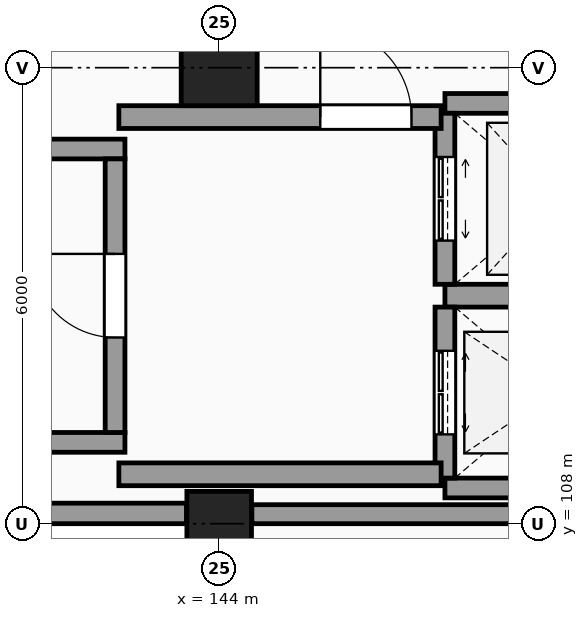
"""IFC4 building model, lengths in metres.
Left out: names, types, materials, properties, quantities, classifications, styles, units other than length and angle.
Written with IfcOpenShell. Run it as: python <this file> out.ifc"""

import sys

from ifc_helpers import new_model, si_unit, direction, frame, frame_2d, origin, origin_2d, place, context, subcontext, project, spatial, rectangle, circle, extrude, element, fill, save


model = new_model("IFC4")
c1 = context("Model", 3, precision=1e-05, world=origin(), true_north=direction((0.0, 1.0)))
c2 = subcontext(c1, "Body", "Model", "MODEL_VIEW")
j1 = project(units=[si_unit("LENGTHUNIT", "METRE"), si_unit("PLANEANGLEUNIT", "RADIAN")], contexts=[c1])
p1 = place(None, origin())
s1 = spatial("IfcSite", under=j1, at=p1, CompositionType="ELEMENT")
p2 = place(p1, origin())
s2 = spatial("IfcBuilding", under=s1, at=p2, CompositionType="ELEMENT")
p3 = place(p2, frame((0.0, 0.0, 6.0)))
s3 = spatial("IfcBuildingStorey", under=s2, at=p3, CompositionType="ELEMENT", Elevation=6.0)
p4 = place(p3, frame((144.0, 108.0, 0.0), z_axis=(0.0, 0.0, 1.0), x_axis=(1.0, 0.0, 0.0)))
e1 = element("IfcColumn", 1, at=p4, inside=s3, PredefinedType="COLUMN", context=c2, shape_type="SweptSolid", body=[
    extrude(circle(Radius=0.425, at=origin_2d()), origin(), (0.0, 0.0, 1.0), 4.5),
])
p5 = place(p3, frame((144.0, 114.0, 0.0), z_axis=(0.0, 0.0, 1.0), x_axis=(1.0, 0.0, 0.0)))
e2 = element("IfcColumn", 2, at=p5, inside=s3, PredefinedType="COLUMN", context=c2, shape_type="SweptSolid", body=[
    extrude(circle(Radius=0.5, at=origin_2d()), origin(), (0.0, 0.0, 1.0), 4.5),
])
p6 = place(p3, frame((138.38, 108.135, 0.0), z_axis=(0.0, 0.0, 1.0), x_axis=(1.0, 0.0, 0.0)))
e3 = element("IfcWall", 3, at=p6, inside=s3, PredefinedType="SOLIDWALL", context=c2, shape_type="SweptSolid", body=[
    extrude(rectangle(XDim=5.19, YDim=0.27, at=frame_2d((2.595, 0.0))), origin(), (0.0, 0.0, 1.0), 3.47),
])
p7 = place(p3, frame((144.43, 108.125, 0.0), z_axis=(0.0, 0.0, 1.0), x_axis=(1.0, 0.0, 0.0)))
e4 = element("IfcWall", 4, at=p7, inside=s3, PredefinedType="SOLIDWALL", context=c2, shape_type="SweptSolid", body=[
    extrude(rectangle(XDim=5.065, YDim=0.25, at=frame_2d((2.533, 0.0))), origin(), (0.0, 0.0, 1.0), 3.47),
])
for number, where, z_axis, x_axis in (
    (5, (132.04, 109.07, 0.0), (0.0, 0.0, 1.0), (1.0, 0.0, 0.0)),
    (6, (132.04, 112.93, 0.0), (0.0, 0.0, 1.0), (1.0, 0.0, 0.0)),
):
    element("IfcWall", number, at=place(p3, frame(where, z_axis=z_axis, x_axis=x_axis)), inside=s3, PredefinedType="SHEAR", context=c2, shape_type="SweptSolid", body=[
        extrude(rectangle(XDim=10.72, YDim=0.26, at=frame_2d((5.36, 0.0))), origin(), (0.0, 0.0, 1.0), 4.5),
    ])
p8 = place(p3, frame((142.63, 109.2, 0.0), z_axis=(0.0, 0.0, 1.0), x_axis=(0.0, 1.0, 0.0)))
e7 = element("IfcWall", 7, at=p8, inside=s3, PredefinedType="SHEAR", context=c2, shape_type="SweptSolid", body=[
    extrude(rectangle(XDim=3.6, YDim=0.26, at=frame_2d((1.8, 0.0))), origin(), (0.0, 0.0, 1.0), 4.5),
])
p9 = place(p8, frame((1.25, 0.0, 0.0)))
e8 = element("IfcOpeningElement", 8, at=p9, cuts=e7, PredefinedType="OPENING", context=c2, shape_type="SweptSolid", body=[
    extrude(rectangle(XDim=1.1, YDim=2.15, at=frame_2d((0.55, 1.075))), frame((0.0, 0.14, 0.0), z_axis=(0.0, -1.0, 0.0), x_axis=(1.0, 0.0, 0.0)), (0.0, 0.0, 1.0), 0.28),
])
p10 = place(p3, frame((146.97, 108.47, 0.0), z_axis=(0.0, 0.0, 1.0), x_axis=(1.0, 0.0, 0.0)))
e9 = element("IfcWall", 9, at=p10, inside=s3, PredefinedType="SHEAR", context=c2, shape_type="SweptSolid", body=[
    extrude(rectangle(XDim=2.91, YDim=0.26, at=frame_2d((1.455, 0.0))), origin(), (0.0, 0.0, 1.0), 4.5),
])
p11 = place(p3, frame((146.97, 111.0, 0.0), z_axis=(0.0, 0.0, 1.0), x_axis=(1.0, 0.0, 0.0)))
e10 = element("IfcWall", 10, at=p11, inside=s3, PredefinedType="SHEAR", context=c2, shape_type="SweptSolid", body=[
    extrude(rectangle(XDim=2.91, YDim=0.3, at=frame_2d((1.455, 0.0))), origin(), (0.0, 0.0, 1.0), 4.5),
])
p12 = place(p3, frame((146.97, 108.6, 0.0), z_axis=(0.0, 0.0, 1.0), x_axis=(0.0, 1.0, 0.0)))
e11 = element("IfcWall", 11, at=p12, inside=s3, PredefinedType="SHEAR", context=c2, shape_type="SweptSolid", body=[
    extrude(rectangle(XDim=2.25, YDim=0.26, at=frame_2d((1.125, 0.0))), origin(), (0.0, 0.0, 1.0), 4.5),
])
p13 = place(p12, frame((0.575, 0.0, 0.0)))
e12 = element("IfcOpeningElement", 12, at=p13, cuts=e11, PredefinedType="OPENING", context=c2, shape_type="SweptSolid", body=[
    extrude(rectangle(XDim=1.1, YDim=2.2, at=frame_2d((0.55, 1.1))), frame((0.0, 0.14, 0.0), z_axis=(0.0, -1.0, 0.0), x_axis=(1.0, 0.0, 0.0)), (0.0, 0.0, 1.0), 0.28),
])
p14 = place(p3, frame((146.97, 113.53, 0.0), z_axis=(0.0, 0.0, 1.0), x_axis=(1.0, 0.0, 0.0)))
e13 = element("IfcWall", 13, at=p14, inside=s3, PredefinedType="SHEAR", context=c2, shape_type="SweptSolid", body=[
    extrude(rectangle(XDim=2.91, YDim=0.26, at=frame_2d((1.455, 0.0))), origin(), (0.0, 0.0, 1.0), 4.5),
])
p15 = place(p3, frame((146.97, 111.15, 0.0), z_axis=(0.0, 0.0, 1.0), x_axis=(0.0, 1.0, 0.0)))
e14 = element("IfcWall", 14, at=p15, inside=s3, PredefinedType="SHEAR", context=c2, shape_type="SweptSolid", body=[
    extrude(rectangle(XDim=2.25, YDim=0.26, at=frame_2d((1.125, 0.0))), origin(), (0.0, 0.0, 1.0), 4.5),
])
p16 = place(p15, frame((0.575, 0.0, 0.0)))
e15 = element("IfcOpeningElement", 15, at=p16, cuts=e14, PredefinedType="OPENING", context=c2, shape_type="SweptSolid", body=[
    extrude(rectangle(XDim=1.1, YDim=2.2, at=frame_2d((0.55, 1.1))), frame((0.0, 0.14, 0.0), z_axis=(0.0, -1.0, 0.0), x_axis=(1.0, 0.0, 0.0)), (0.0, 0.0, 1.0), 0.28),
])
p17 = place(p3, frame((142.68, 113.35, 0.0), z_axis=(0.0, 0.0, 1.0), x_axis=(1.0, 0.0, 0.0)))
e16 = element("IfcWall", 16, at=p17, inside=s3, PredefinedType="SHEAR", context=c2, shape_type="SweptSolid", body=[
    extrude(rectangle(XDim=4.24, YDim=0.3, at=frame_2d((2.12, 0.0))), origin(), (0.0, 0.0, 1.0), 4.5),
])
p18 = place(p17, frame((2.65, 0.0, 0.0)))
e17 = element("IfcOpeningElement", 17, at=p18, cuts=e16, PredefinedType="OPENING", context=c2, shape_type="SweptSolid", body=[
    extrude(rectangle(XDim=1.2, YDim=2.2, at=frame_2d((0.6, 1.1))), frame((0.0, 0.16, 0.0), z_axis=(0.0, -1.0, 0.0), x_axis=(1.0, 0.0, 0.0)), (0.0, 0.0, 1.0), 0.32),
])
p19 = place(p3, frame((142.68, 108.65, 0.0), z_axis=(0.0, 0.0, 1.0), x_axis=(1.0, 0.0, 0.0)))
e18 = element("IfcWall", 18, at=p19, inside=s3, PredefinedType="SHEAR", context=c2, shape_type="SweptSolid", body=[
    extrude(rectangle(XDim=4.24, YDim=0.3, at=frame_2d((2.12, 0.0))), origin(), (0.0, 0.0, 1.0), 4.5),
])
p20 = place(p9, origin())
e19 = element("IfcDoor", 19, at=p20, inside=s3, OperationType="SINGLE_SWING_RIGHT", PredefinedType="DOOR", context=c2, shape_type="SweptSolid", body=[
    extrude(rectangle(XDim=1.1, YDim=2.15, at=frame_2d((0.55, 1.075))), frame((0.0, 0.025, 0.0), z_axis=(0.0, -1.0, 0.0), x_axis=(1.0, 0.0, 0.0)), (0.0, 0.0, 1.0), 0.05),
])
fill(e8, e19)
p21 = place(p13, origin())
e20 = element("IfcDoor", 20, at=p21, inside=s3, OperationType="DOUBLE_DOOR_SLIDING", PredefinedType="DOOR", context=c2, shape_type="SweptSolid", body=[
    extrude(rectangle(XDim=1.1, YDim=2.2, at=frame_2d((0.55, 1.1))), frame((0.0, 0.025, 0.0), z_axis=(0.0, -1.0, 0.0), x_axis=(1.0, 0.0, 0.0)), (0.0, 0.0, 1.0), 0.05),
])
fill(e12, e20)
p22 = place(p16, origin())
e21 = element("IfcDoor", 21, at=p22, inside=s3, OperationType="DOUBLE_DOOR_SLIDING", PredefinedType="DOOR", context=c2, shape_type="SweptSolid", body=[
    extrude(rectangle(XDim=1.1, YDim=2.2, at=frame_2d((0.55, 1.1))), frame((0.0, 0.025, 0.0), z_axis=(0.0, -1.0, 0.0), x_axis=(1.0, 0.0, 0.0)), (0.0, 0.0, 1.0), 0.05),
])
fill(e15, e21)
p23 = place(p18, origin())
e22 = element("IfcDoor", 22, at=p23, inside=s3, OperationType="SINGLE_SWING_LEFT", PredefinedType="DOOR", context=c2, shape_type="SweptSolid", body=[
    extrude(rectangle(XDim=1.2, YDim=2.2, at=frame_2d((0.6, 1.1))), frame((0.0, 0.025, 0.0), z_axis=(0.0, -1.0, 0.0), x_axis=(1.0, 0.0, 0.0)), (0.0, 0.0, 1.0), 0.05),
])
fill(e17, e22)
save(model, sys.argv[1])
